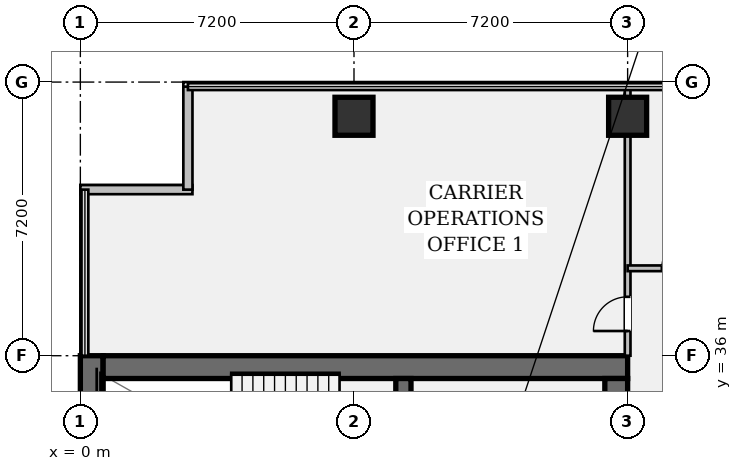
"""IFC4 building model, lengths in metres.
Left out: names, types, materials, properties, quantities, classifications, styles, units other than length and angle.
Written with IfcOpenShell. Run it as: python <this file> out.ifc"""

import sys

from ifc_helpers import new_model, si_unit, direction, frame, frame_2d, origin, origin_2d, place, context, subcontext, project, spatial, rectangle, hollow_rectangle, extrude, element, fill, save


model = new_model("IFC4")
c1 = context("Model", 3, precision=1e-05, world=origin(), true_north=direction((0.0, 1.0)))
c2 = subcontext(c1, "Body", "Model", "MODEL_VIEW")
j1 = project(units=[si_unit("LENGTHUNIT", "METRE"), si_unit("PLANEANGLEUNIT", "RADIAN")], contexts=[c1])
p1 = place(None, origin())
s1 = spatial("IfcSite", under=j1, at=p1, CompositionType="ELEMENT")
p2 = place(p1, origin())
s2 = spatial("IfcBuilding", under=s1, at=p2, CompositionType="ELEMENT")
p3 = place(p2, frame((0.0, 0.0, 61.95)))
s3 = spatial("IfcBuildingStorey", under=s2, at=p3, CompositionType="ELEMENT", Elevation=61.95)
p4 = place(p3, frame((0.3, 7.2, 0.0), z_axis=(0.0, 0.0, 1.0), x_axis=(0.0, 1.0, 0.0)))
e1 = element("IfcWall", 1, at=p4, inside=s3, PredefinedType="SHEAR", context=c2, shape_type="SweptSolid", body=[
    extrude(rectangle(XDim=28.8, YDim=0.6, at=frame_2d((14.4, 0.0))), origin(), (0.0, 0.0, 1.0), 3.57),
])
p5 = place(p3, frame((0.6, 35.7, 0.0), z_axis=(0.0, 0.0, 1.0), x_axis=(1.0, 0.0, 0.0)))
e2 = element("IfcWall", 2, at=p5, inside=s3, PredefinedType="SHEAR", context=c2, shape_type="SweptSolid", body=[
    extrude(rectangle(XDim=13.8, YDim=0.6, at=frame_2d((6.9, 0.0))), origin(), (0.0, 0.0, 1.0), 3.57),
])
p6 = place(p3, frame((14.1, 35.4, 0.0), z_axis=(0.0, 0.0, 1.0), x_axis=(0.0, -1.0, 0.0)))
e3 = element("IfcWall", 3, at=p6, inside=s3, PredefinedType="SHEAR", context=c2, shape_type="SweptSolid", body=[
    extrude(rectangle(XDim=27.6, YDim=0.6, at=frame_2d((13.8, 0.0))), origin(), (0.0, 0.0, 1.0), 3.57),
])
p7 = place(p6, frame((1.3, 0.0, 0.0)))
e4 = element("IfcOpeningElement", 4, at=p7, cuts=e3, PredefinedType="OPENING", context=c2, shape_type="SweptSolid", body=[
    extrude(rectangle(XDim=1.2, YDim=2.15, at=frame_2d((0.6, 1.075))), frame((0.0, 0.312, 0.0), z_axis=(0.0, -1.0, 0.0), x_axis=(1.0, 0.0, 0.0)), (0.0, 0.0, 1.0), 0.624),
])
p8 = place(p6, frame((25.25, 0.0, 0.0)))
e5 = element("IfcOpeningElement", 5, at=p8, cuts=e3, PredefinedType="OPENING", context=c2, shape_type="SweptSolid", body=[
    extrude(rectangle(XDim=1.2, YDim=2.15, at=frame_2d((0.6, 1.075))), frame((0.0, 0.312, 0.0), z_axis=(0.0, -1.0, 0.0), x_axis=(1.0, 0.0, 0.0)), (0.0, 0.0, 1.0), 0.624),
])
p9 = place(p6, frame((14.6, 0.0, 0.0)))
e6 = element("IfcOpeningElement", 6, at=p9, cuts=e3, PredefinedType="OPENING", context=c2, shape_type="SweptSolid", body=[
    extrude(rectangle(XDim=1.6, YDim=2.2, at=frame_2d((0.8, 1.1))), frame((0.0, 0.312, 0.0), z_axis=(0.0, -1.0, 0.0), x_axis=(1.0, 0.0, 0.0)), (0.0, 0.0, 1.0), 0.624),
])
p10 = place(p3, frame((8.5, 31.72, 0.0), z_axis=(0.0, 0.0, 1.0), x_axis=(0.0, 1.0, 0.0)))
e7 = element("IfcWall", 7, at=p10, inside=s3, PredefinedType="SHEAR", context=c2, shape_type="SweptSolid", body=[
    extrude(rectangle(XDim=3.68, YDim=0.4, at=frame_2d((1.84, 0.0))), origin(), (0.0, 0.0, 1.0), 3.57),
])
p11 = place(p10, frame((0.9, 0.0, 0.0)))
e8 = element("IfcOpeningElement", 8, at=p11, cuts=e7, PredefinedType="OPENING", context=c2, shape_type="SweptSolid", body=[
    extrude(rectangle(XDim=1.1, YDim=2.15, at=frame_2d((0.55, 1.075))), frame((0.0, 0.212, 0.0), z_axis=(0.0, -1.0, 0.0), x_axis=(1.0, 0.0, 0.0)), (0.0, 0.0, 1.0), 0.424),
])
for number, where, z_axis, x_axis in (
    (9, (7.2, 42.3, 0.0), (0.0, 0.0, 1.0), (1.0, 0.0, 0.0)),
    (10, (14.4, 42.3, 0.0), (0.0, 0.0, 1.0), (1.0, 0.0, 0.0)),
):
    element("IfcColumn", number, at=place(p3, frame(where, z_axis=z_axis, x_axis=x_axis)), inside=s3, PredefinedType="COLUMN", context=c2, shape_type="SweptSolid", body=[
        extrude(hollow_rectangle(XDim=1.0, YDim=1.0, WallThickness=0.065, at=origin_2d()), origin(), (0.0, 0.0, 1.0), 3.57),
    ])
p12 = place(p3, frame((0.0, 40.37, 0.0), z_axis=(0.0, 0.0, 1.0), x_axis=(1.0, 0.0, 0.0)))
e11 = element("IfcWall", 11, at=p12, inside=s3, PredefinedType="STANDARD", context=c2, shape_type="SweptSolid", body=[
    extrude(rectangle(XDim=2.95, YDim=0.24, at=frame_2d((1.475, 0.0))), origin(), (0.0, 0.0, 1.0), 3.57),
])
p13 = place(p3, frame((2.83, 40.37, 0.0), z_axis=(0.0, 0.0, 1.0), x_axis=(0.0, 1.0, 0.0)))
e12 = element("IfcWall", 12, at=p13, inside=s3, PredefinedType="STANDARD", context=c2, shape_type="SweptSolid", body=[
    extrude(rectangle(XDim=2.71, YDim=0.24, at=frame_2d((1.355, 0.0))), origin(), (0.0, 0.0, 1.0), 3.57),
])
p14 = place(p3, frame((14.4, 36.0, 0.0), z_axis=(0.0, 0.0, 1.0), x_axis=(0.0, 1.0, 0.0)))
e13 = element("IfcWall", 13, at=p14, inside=s3, PredefinedType="PARTITIONING", context=c2, shape_type="SweptSolid", body=[
    extrude(rectangle(XDim=7.08, YDim=0.15, at=frame_2d((3.54, 0.0))), origin(), (0.0, 0.0, 1.0), 2.699),
])
p15 = place(p14, frame((0.65, 0.0, 0.0)))
e14 = element("IfcOpeningElement", 14, at=p15, cuts=e13, PredefinedType="OPENING", context=c2, shape_type="SweptSolid", body=[
    extrude(rectangle(XDim=0.9, YDim=2.15, at=frame_2d((0.45, 1.075))), frame((0.0, 0.087, 0.0), z_axis=(0.0, -1.0, 0.0), x_axis=(1.0, 0.0, 0.0)), (0.0, 0.0, 1.0), 0.174),
])
p16 = place(p3, frame((14.4, 38.3, 0.0), z_axis=(0.0, 0.0, 1.0), x_axis=(1.0, 0.0, 0.0)))
e15 = element("IfcWall", 15, at=p16, inside=s3, PredefinedType="PARTITIONING", context=c2, shape_type="SweptSolid", body=[
    extrude(rectangle(XDim=2.95, YDim=0.15, at=frame_2d((1.475, 0.0))), origin(), (0.0, 0.0, 1.0), 2.699),
])
p17 = place(p16, frame((0.9, 0.0, 0.0)))
e16 = element("IfcOpeningElement", 16, at=p17, cuts=e15, PredefinedType="OPENING", context=c2, shape_type="SweptSolid", body=[
    extrude(rectangle(XDim=0.95, YDim=2.15, at=frame_2d((0.475, 1.075))), frame((0.0, 0.087, 0.0), z_axis=(0.0, -1.0, 0.0), x_axis=(1.0, 0.0, 0.0)), (0.0, 0.0, 1.0), 0.174),
])
p18 = place(p15, origin())
e17 = element("IfcDoor", 17, at=p18, inside=s3, OperationType="SINGLE_SWING_LEFT", PredefinedType="DOOR", context=c2, shape_type="SweptSolid", body=[
    extrude(rectangle(XDim=0.9, YDim=2.15, at=frame_2d((0.45, 1.075))), frame((0.0, 0.025, 0.0), z_axis=(0.0, -1.0, 0.0), x_axis=(1.0, 0.0, 0.0)), (0.0, 0.0, 1.0), 0.05),
])
fill(e14, e17)
p19 = place(p17, origin())
e18 = element("IfcDoor", 18, at=p19, inside=s3, OperationType="SINGLE_SWING_RIGHT", PredefinedType="DOOR", context=c2, shape_type="SweptSolid", body=[
    extrude(rectangle(XDim=0.95, YDim=2.15, at=frame_2d((0.475, 1.075))), frame((0.0, 0.025, 0.0), z_axis=(0.0, -1.0, 0.0), x_axis=(1.0, 0.0, 0.0)), (0.0, 0.0, 1.0), 0.05),
])
fill(e16, e18)
save(model, sys.argv[1])
